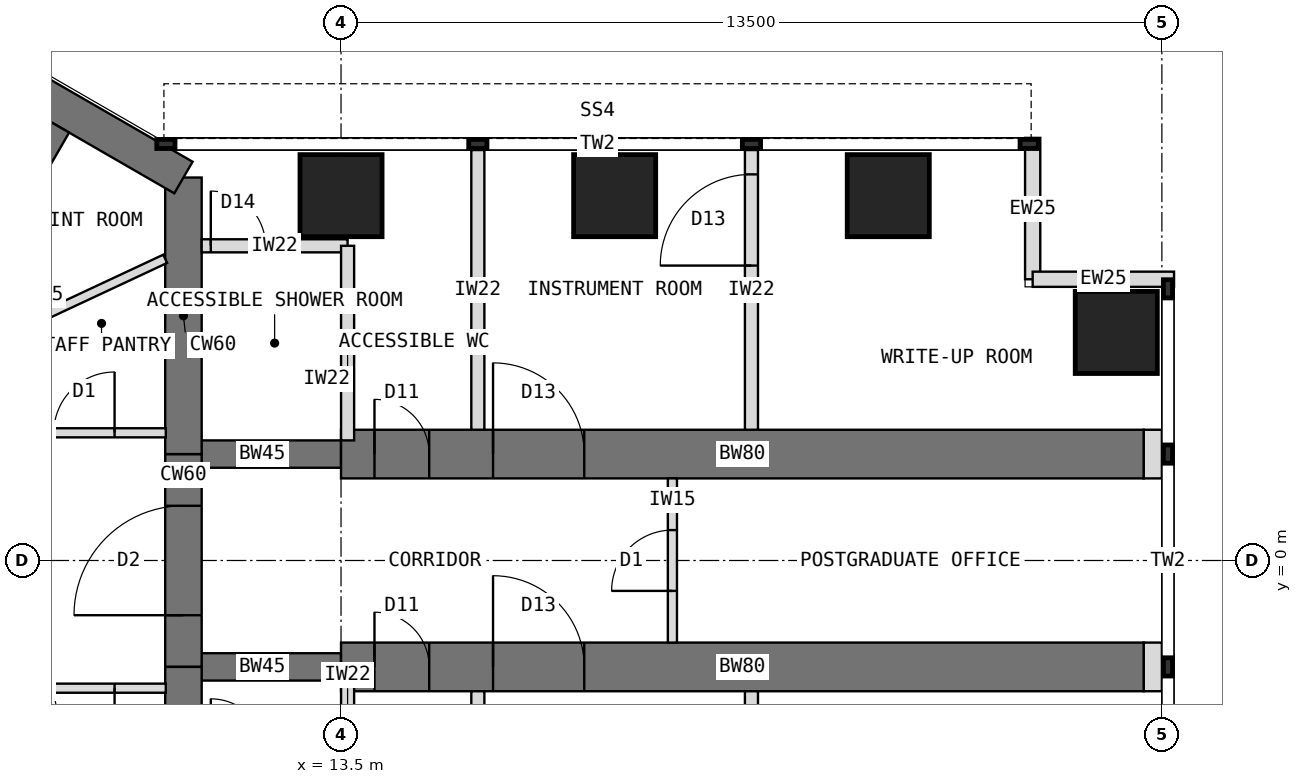
"""IFC4 building model, lengths in metres.
Left out: names, types, materials, properties, quantities, classifications, styles, units other than length and angle.
Written with IfcOpenShell. Run it as: python <this file> out.ifc"""

import sys

from ifc_helpers import new_model, si_unit, direction, frame, frame_2d, origin, origin_2d, place, context, subcontext, project, spatial, rectangle, extrude, element, fill, save


model = new_model("IFC4")
c1 = context("Model", 3, precision=1e-05, world=origin(), true_north=direction((0.0, 1.0)))
c2 = subcontext(c1, "Body", "Model", "MODEL_VIEW")
j1 = project(units=[si_unit("LENGTHUNIT", "METRE"), si_unit("PLANEANGLEUNIT", "RADIAN")], contexts=[c1])
p1 = place(None, origin())
s1 = spatial("IfcSite", under=j1, at=p1, CompositionType="ELEMENT")
p2 = place(p1, origin())
s2 = spatial("IfcBuilding", under=s1, at=p2, CompositionType="ELEMENT")
p3 = place(p2, frame((0.0, 0.0, 113.5)))
s3 = spatial("IfcBuildingStorey", under=s2, at=p3, CompositionType="ELEMENT", Elevation=113.5)
p4 = place(p3, frame((10.908, -6.298, 0.0), z_axis=(0.0, 0.0, 1.0), x_axis=(0.0, 1.0, 0.0)))
e1 = element("IfcWall", 1, at=p4, inside=s3, PredefinedType="SHEAR", context=c2, shape_type="SweptSolid", body=[
    extrude(rectangle(XDim=4.548, YDim=0.6, at=frame_2d((2.274, 0.0))), origin(), (0.0, 0.0, 1.0), 4.0),
])
p5 = place(p3, frame((10.908, -1.75, 0.0), z_axis=(0.0, 0.0, 1.0), x_axis=(0.0, 1.0, 0.0)))
e2 = element("IfcWall", 2, at=p5, inside=s3, PredefinedType="SHEAR", context=c2, shape_type="SweptSolid", body=[
    extrude(rectangle(XDim=3.5, YDim=0.6, at=frame_2d((1.75, 0.0))), origin(), (0.0, 0.0, 1.0), 4.0),
])
p6 = place(p5, frame((0.85, 0.0, 0.0)))
e3 = element("IfcOpeningElement", 3, at=p6, cuts=e2, PredefinedType="OPENING", context=c2, shape_type="SweptSolid", body=[
    extrude(rectangle(XDim=1.8, YDim=2.1, at=frame_2d((0.9, 1.05))), frame((0.0, 0.31, 0.0), z_axis=(0.0, -1.0, 0.0), x_axis=(1.0, 0.0, 0.0)), (0.0, 0.0, 1.0), 0.62),
])
p7 = place(p3, frame((10.908, 1.75, 0.0), z_axis=(0.0, 0.0, 1.0), x_axis=(0.0, 1.0, 0.0)))
e4 = element("IfcWall", 4, at=p7, inside=s3, PredefinedType="SHEAR", context=c2, shape_type="SweptSolid", body=[
    extrude(rectangle(XDim=4.548, YDim=0.6, at=frame_2d((2.274, 0.0))), origin(), (0.0, 0.0, 1.0), 4.0),
])
p8 = place(p3, frame((10.908, 6.298, 0.0), z_axis=(0.0, 0.0, 1.0), x_axis=(-0.866021940709, 0.500005998175, 0.0)))
e5 = element("IfcWall", 5, at=p8, inside=s3, PredefinedType="SHEAR", context=c2, shape_type="SweptSolid", body=[
    extrude(rectangle(XDim=12.596, YDim=0.6, at=frame_2d((6.298, 0.0))), origin(), (0.0, 0.0, 1.0), 4.0),
])
p9 = place(p3, frame((10.908, 1.75, 0.0), z_axis=(0.0, 0.0, 1.0), x_axis=(1.0, 0.0, 0.0)))
e6 = element("IfcWall", 6, at=p9, inside=s3, PredefinedType="SHEAR", context=c2, shape_type="SweptSolid", body=[
    extrude(rectangle(XDim=2.592, YDim=0.45, at=frame_2d((1.296, 0.0))), origin(), (0.0, 0.0, 1.0), 4.0),
])
p10 = place(p3, frame((13.5, 1.75, 0.0), z_axis=(0.0, 0.0, 1.0), x_axis=(1.0, 0.0, 0.0)))
e7 = element("IfcWall", 7, at=p10, inside=s3, PredefinedType="SHEAR", context=c2, shape_type="SweptSolid", body=[
    extrude(rectangle(XDim=13.2, YDim=0.8, at=frame_2d((6.6, 0.0))), origin(), (0.0, 0.0, 1.0), 4.0),
])
p11 = place(p10, frame((0.55, 0.0, 0.0)))
e8 = element("IfcOpeningElement", 8, at=p11, cuts=e7, PredefinedType="OPENING", context=c2, shape_type="SweptSolid", body=[
    extrude(rectangle(XDim=0.9, YDim=2.1, at=frame_2d((0.45, 1.05))), frame((0.0, 0.41, 0.0), z_axis=(0.0, -1.0, 0.0), x_axis=(1.0, 0.0, 0.0)), (0.0, 0.0, 1.0), 0.82),
])
p12 = place(p10, frame((2.5, 0.0, 0.0)))
e9 = element("IfcOpeningElement", 9, at=p12, cuts=e7, PredefinedType="OPENING", context=c2, shape_type="SweptSolid", body=[
    extrude(rectangle(XDim=1.5, YDim=2.1, at=frame_2d((0.75, 1.05))), frame((0.0, 0.41, 0.0), z_axis=(0.0, -1.0, 0.0), x_axis=(1.0, 0.0, 0.0)), (0.0, 0.0, 1.0), 0.82),
])
p13 = place(p3, frame((10.908, -1.75, 0.0), z_axis=(0.0, 0.0, 1.0), x_axis=(1.0, 0.0, 0.0)))
e10 = element("IfcWall", 10, at=p13, inside=s3, PredefinedType="SHEAR", context=c2, shape_type="SweptSolid", body=[
    extrude(rectangle(XDim=2.592, YDim=0.45, at=frame_2d((1.296, 0.0))), origin(), (0.0, 0.0, 1.0), 4.0),
])
p14 = place(p3, frame((13.5, -1.75, 0.0), z_axis=(0.0, 0.0, 1.0), x_axis=(1.0, 0.0, 0.0)))
e11 = element("IfcWall", 11, at=p14, inside=s3, PredefinedType="SHEAR", context=c2, shape_type="SweptSolid", body=[
    extrude(rectangle(XDim=13.2, YDim=0.8, at=frame_2d((6.6, 0.0))), origin(), (0.0, 0.0, 1.0), 4.0),
])
p15 = place(p14, frame((0.55, 0.0, 0.0)))
e12 = element("IfcOpeningElement", 12, at=p15, cuts=e11, PredefinedType="OPENING", context=c2, shape_type="SweptSolid", body=[
    extrude(rectangle(XDim=0.9, YDim=2.1, at=frame_2d((0.45, 1.05))), frame((0.0, 0.41, 0.0), z_axis=(0.0, -1.0, 0.0), x_axis=(1.0, 0.0, 0.0)), (0.0, 0.0, 1.0), 0.82),
])
p16 = place(p14, frame((2.5, 0.0, 0.0)))
e13 = element("IfcOpeningElement", 13, at=p16, cuts=e11, PredefinedType="OPENING", context=c2, shape_type="SweptSolid", body=[
    extrude(rectangle(XDim=1.5, YDim=2.1, at=frame_2d((0.75, 1.05))), frame((0.0, 0.41, 0.0), z_axis=(0.0, -1.0, 0.0), x_axis=(1.0, 0.0, 0.0)), (0.0, 0.0, 1.0), 0.82),
])
for number, where, z_axis, x_axis in (
    (14, (13.5, 6.0, 0.0), (0.0, 0.0, 1.0), (1.0, 0.0, 0.0)),
    (15, (18.0, 6.0, 0.0), (0.0, 0.0, 1.0), (1.0, 0.0, 0.0)),
    (16, (22.5, 6.0, 0.0), (0.0, 0.0, 1.0), (1.0, 0.0, 0.0)),
    (17, (26.25, 3.75, 0.0), (0.0, 0.0, 1.0), (1.0, 0.0, 0.0)),
):
    element("IfcColumn", number, at=place(p3, frame(where, z_axis=z_axis, x_axis=x_axis)), inside=s3, PredefinedType="COLUMN", context=c2, shape_type="SweptSolid", body=[
        extrude(rectangle(XDim=1.35, YDim=1.35, at=origin_2d()), origin(), (0.0, 0.0, 1.0), 4.0),
    ])
for number, where, z_axis, x_axis in (
    (18, (24.875, 6.95, 0.0), (0.0, 0.0, 1.0), (0.0, -1.0, 0.0)),
    (19, (24.875, 4.625, 0.0), (0.0, 0.0, 1.0), (1.0, 0.0, 0.0)),
):
    element("IfcWall", number, at=place(p3, frame(where, z_axis=z_axis, x_axis=x_axis)), inside=s3, PredefinedType="STANDARD", context=c2, shape_type="SweptSolid", body=[
        extrude(rectangle(XDim=2.325, YDim=0.25, at=frame_2d((1.163, 0.0))), origin(), (0.0, 0.0, 1.0), 3.8),
    ])
for number, where, z_axis, x_axis in (
    (20, (26.7, 1.75, 0.0), (0.0, 0.0, 1.0), (1.0, 0.0, 0.0)),
    (21, (26.7, -1.75, 0.0), (0.0, 0.0, 1.0), (1.0, 0.0, 0.0)),
):
    element("IfcWall", number, at=place(p3, frame(where, z_axis=z_axis, x_axis=x_axis)), inside=s3, PredefinedType="PARTITIONING", context=c2, shape_type="SweptSolid", body=[
        extrude(rectangle(XDim=0.3, YDim=0.8, at=frame_2d((0.15, 0.0))), origin(), (0.0, 0.0, 1.0), 3.8),
    ])
for number, where, z_axis, x_axis in (
    (22, (5.901, 2.02, 0.0), (0.0, 0.0, 1.0), (0.5, 0.866, 0.0)),
    (23, (5.901, -2.02, 0.0), (0.0, 0.0, 1.0), (0.5, -0.866, 0.0)),
):
    element("IfcWall", number, at=place(p3, frame(where, z_axis=z_axis, x_axis=x_axis)), inside=s3, PredefinedType="SHEAR", context=c2, shape_type="SweptSolid", body=[
        extrude(rectangle(XDim=5.908, YDim=0.4, at=frame_2d((2.954, 0.0))), origin(), (0.0, 0.0, 1.0), 4.0),
    ])
p17 = place(p3, frame((15.75, 2.15, 0.0), z_axis=(0.0, 0.0, 1.0), x_axis=(0.0, 1.0, 0.0)))
e24 = element("IfcWall", 24, at=p17, inside=s3, PredefinedType="PARTITIONING", context=c2, shape_type="SweptSolid", body=[
    extrude(rectangle(XDim=4.6, YDim=0.215, at=frame_2d((2.3, 0.0))), origin(), (0.0, 0.0, 1.0), 3.8),
])
p18 = place(p3, frame((20.25, 2.15, 0.0), z_axis=(0.0, 0.0, 1.0), x_axis=(0.0, 1.0, 0.0)))
e25 = element("IfcWall", 25, at=p18, inside=s3, PredefinedType="PARTITIONING", context=c2, shape_type="SweptSolid", body=[
    extrude(rectangle(XDim=4.6, YDim=0.215, at=frame_2d((2.3, 0.0))), origin(), (0.0, 0.0, 1.0), 3.8),
])
p19 = place(p18, frame((2.7, 0.0, 0.0)))
e26 = element("IfcOpeningElement", 26, at=p19, cuts=e25, PredefinedType="OPENING", context=c2, shape_type="SweptSolid", body=[
    extrude(rectangle(XDim=1.5, YDim=2.1, at=frame_2d((0.75, 1.05))), frame((0.0, 0.117, 0.0), z_axis=(0.0, -1.0, 0.0), x_axis=(1.0, 0.0, 0.0)), (0.0, 0.0, 1.0), 0.235),
])
p20 = place(p3, frame((11.208, 5.175, 0.0), z_axis=(0.0, 0.0, 1.0), x_axis=(1.0, 0.0, 0.0)))
e27 = element("IfcWall", 27, at=p20, inside=s3, PredefinedType="PARTITIONING", context=c2, shape_type="SweptSolid", body=[
    extrude(rectangle(XDim=2.4, YDim=0.215, at=frame_2d((1.2, 0.0))), origin(), (0.0, 0.0, 1.0), 3.8),
])
p21 = place(p20, frame((0.15, 0.0, 0.0)))
e28 = element("IfcOpeningElement", 28, at=p21, cuts=e27, PredefinedType="OPENING", context=c2, shape_type="SweptSolid", body=[
    extrude(rectangle(XDim=0.9, YDim=2.1, at=frame_2d((0.45, 1.05))), frame((0.0, 0.117, 0.0), z_axis=(0.0, -1.0, 0.0), x_axis=(1.0, 0.0, 0.0)), (0.0, 0.0, 1.0), 0.235),
])
p22 = place(p3, frame((13.608, 1.975, 0.0), z_axis=(0.0, 0.0, 1.0), x_axis=(0.0, 1.0, 0.0)))
e29 = element("IfcWall", 29, at=p22, inside=s3, PredefinedType="PARTITIONING", context=c2, shape_type="SweptSolid", body=[
    extrude(rectangle(XDim=3.2, YDim=0.215, at=frame_2d((1.6, 0.0))), origin(), (0.0, 0.0, 1.0), 3.8),
])
p23 = place(p3, frame((15.75, -2.15, 0.0), z_axis=(0.0, 0.0, 1.0), x_axis=(0.0, -1.0, 0.0)))
e30 = element("IfcWall", 30, at=p23, inside=s3, PredefinedType="PARTITIONING", context=c2, shape_type="SweptSolid", body=[
    extrude(rectangle(XDim=4.6, YDim=0.215, at=frame_2d((2.3, 0.0))), origin(), (0.0, 0.0, 1.0), 3.8),
])
p24 = place(p3, frame((20.25, -2.15, 0.0), z_axis=(0.0, 0.0, 1.0), x_axis=(0.0, -1.0, 0.0)))
e31 = element("IfcWall", 31, at=p24, inside=s3, PredefinedType="PARTITIONING", context=c2, shape_type="SweptSolid", body=[
    extrude(rectangle(XDim=4.6, YDim=0.215, at=frame_2d((2.3, 0.0))), origin(), (0.0, 0.0, 1.0), 3.8),
])
p25 = place(p24, frame((2.7, 0.0, 0.0)))
e32 = element("IfcOpeningElement", 32, at=p25, cuts=e31, PredefinedType="OPENING", context=c2, shape_type="SweptSolid", body=[
    extrude(rectangle(XDim=1.5, YDim=2.1, at=frame_2d((0.75, 1.05))), frame((0.0, 0.117, 0.0), z_axis=(0.0, -1.0, 0.0), x_axis=(1.0, 0.0, 0.0)), (0.0, 0.0, 1.0), 0.235),
])
p26 = place(p3, frame((13.608, -1.975, 0.0), z_axis=(0.0, 0.0, 1.0), x_axis=(0.0, -1.0, 0.0)))
e33 = element("IfcWall", 33, at=p26, inside=s3, PredefinedType="PARTITIONING", context=c2, shape_type="SweptSolid", body=[
    extrude(rectangle(XDim=1.2, YDim=0.215, at=frame_2d((0.6, 0.0))), origin(), (0.0, 0.0, 1.0), 3.8),
])
p27 = place(p3, frame((6.143, 2.1, 0.0), z_axis=(0.0, 0.0, 1.0), x_axis=(1.0, 0.0, 0.0)))
e34 = element("IfcWall", 34, at=p27, inside=s3, PredefinedType="PARTITIONING", context=c2, shape_type="SweptSolid", body=[
    extrude(rectangle(XDim=4.476, YDim=0.15, at=frame_2d((2.238, 0.0))), origin(), (0.0, 0.0, 1.0), 3.8),
])
p28 = place(p27, frame((2.633, 0.0, 0.0)))
e35 = element("IfcOpeningElement", 35, at=p28, cuts=e34, PredefinedType="OPENING", context=c2, shape_type="SweptSolid", body=[
    extrude(rectangle(XDim=1.0, YDim=2.1, at=frame_2d((0.5, 1.05))), frame((0.0, 0.085, 0.0), z_axis=(0.0, -1.0, 0.0), x_axis=(1.0, 0.0, 0.0)), (0.0, 0.0, 1.0), 0.17),
])
p29 = place(p3, frame((10.618, -2.1, 0.0), z_axis=(0.0, 0.0, 1.0), x_axis=(-1.0, 0.0, 0.0)))
e36 = element("IfcWall", 36, at=p29, inside=s3, PredefinedType="PARTITIONING", context=c2, shape_type="SweptSolid", body=[
    extrude(rectangle(XDim=4.476, YDim=0.15, at=frame_2d((2.238, 0.0))), origin(), (0.0, 0.0, 1.0), 3.8),
])
p30 = place(p29, frame((0.843, 0.0, 0.0)))
e37 = element("IfcOpeningElement", 37, at=p30, cuts=e36, PredefinedType="OPENING", context=c2, shape_type="SweptSolid", body=[
    extrude(rectangle(XDim=1.0, YDim=2.1, at=frame_2d((0.5, 1.05))), frame((0.0, 0.085, 0.0), z_axis=(0.0, -1.0, 0.0), x_axis=(1.0, 0.0, 0.0)), (0.0, 0.0, 1.0), 0.17),
])
p31 = place(p3, frame((6.485, 3.033, 0.0), z_axis=(0.0, 0.0, 1.0), x_axis=(0.905834774787, 0.423631161255, 0.0)))
e38 = element("IfcWall", 38, at=p31, inside=s3, PredefinedType="PARTITIONING", context=c2, shape_type="SweptSolid", body=[
    extrude(rectangle(XDim=4.552, YDim=0.15, at=frame_2d((2.276, 0.0))), origin(), (0.0, 0.0, 1.0), 3.8),
])
p32 = place(p31, frame((0.865, 0.0, 0.0)))
e39 = element("IfcOpeningElement", 39, at=p32, cuts=e38, PredefinedType="OPENING", context=c2, shape_type="SweptSolid", body=[
    extrude(rectangle(XDim=1.0, YDim=2.1, at=frame_2d((0.5, 1.05))), frame((0.0, 0.085, 0.0), z_axis=(0.0, -1.0, 0.0), x_axis=(1.0, 0.0, 0.0)), (0.0, 0.0, 1.0), 0.17),
])
p33 = place(p3, frame((18.95, -1.35, 0.0), z_axis=(0.0, 0.0, 1.0), x_axis=(0.0, 1.0, 0.0)))
e40 = element("IfcWall", 40, at=p33, inside=s3, PredefinedType="PARTITIONING", context=c2, shape_type="SweptSolid", body=[
    extrude(rectangle(XDim=2.7, YDim=0.15, at=frame_2d((1.35, 0.0))), origin(), (0.0, 0.0, 1.0), 3.8),
])
p34 = place(p33, frame((0.85, 0.0, 0.0)))
e41 = element("IfcOpeningElement", 41, at=p34, cuts=e40, PredefinedType="OPENING", context=c2, shape_type="SweptSolid", body=[
    extrude(rectangle(XDim=1.0, YDim=2.1, at=frame_2d((0.5, 1.05))), frame((0.0, 0.085, 0.0), z_axis=(0.0, -1.0, 0.0), x_axis=(1.0, 0.0, 0.0)), (0.0, 0.0, 1.0), 0.17),
])
p35 = place(p6, origin())
e42 = element("IfcDoor", 42, at=p35, inside=s3, OperationType="DOUBLE_DOOR_DOUBLE_SWING", PredefinedType="DOOR", context=c2, shape_type="SweptSolid", body=[
    extrude(rectangle(XDim=1.72, YDim=2.06, at=frame_2d((0.9, 1.03))), frame((0.0, 0.025, 0.0), z_axis=(0.0, -1.0, 0.0), x_axis=(1.0, 0.0, 0.0)), (0.0, 0.0, 1.0), 0.05),
    extrude(rectangle(XDim=0.04, YDim=2.1, at=frame_2d((0.02, 1.05))), frame((0.0, 0.3, 0.0), z_axis=(0.0, -1.0, 0.0), x_axis=(1.0, 0.0, 0.0)), (0.0, 0.0, 1.0), 0.6),
    extrude(rectangle(XDim=0.04, YDim=2.1, at=frame_2d((1.78, 1.05))), frame((0.0, 0.3, 0.0), z_axis=(0.0, -1.0, 0.0), x_axis=(1.0, 0.0, 0.0)), (0.0, 0.0, 1.0), 0.6),
    extrude(rectangle(XDim=1.72, YDim=0.04, at=frame_2d((0.9, 2.08))), frame((0.0, 0.3, 0.0), z_axis=(0.0, -1.0, 0.0), x_axis=(1.0, 0.0, 0.0)), (0.0, 0.0, 1.0), 0.6),
])
fill(e3, e42)
p36 = place(p19, origin())
e43 = element("IfcDoor", 43, at=p36, inside=s3, OperationType="DOUBLE_DOOR_SINGLE_SWING", PredefinedType="DOOR", context=c2, shape_type="SweptSolid", body=[
    extrude(rectangle(XDim=1.5, YDim=2.1, at=frame_2d((0.75, 1.05))), frame((0.0, 0.025, 0.0), z_axis=(0.0, -1.0, 0.0), x_axis=(1.0, 0.0, 0.0)), (0.0, 0.0, 1.0), 0.05),
])
fill(e26, e43)
p37 = place(p21, origin())
e44 = element("IfcDoor", 44, at=p37, inside=s3, OperationType="SINGLE_SWING_LEFT", PredefinedType="DOOR", context=c2, shape_type="SweptSolid", body=[
    extrude(rectangle(XDim=0.9, YDim=2.1, at=frame_2d((0.45, 1.05))), frame((0.0, 0.025, 0.0), z_axis=(0.0, -1.0, 0.0), x_axis=(1.0, 0.0, 0.0)), (0.0, 0.0, 1.0), 0.05),
])
fill(e28, e44)
p38 = place(p30, origin())
e45 = element("IfcDoor", 45, at=p38, inside=s3, OperationType="SINGLE_SWING_LEFT", PredefinedType="DOOR", context=c2, shape_type="SweptSolid", body=[
    extrude(rectangle(XDim=1.0, YDim=2.1, at=frame_2d((0.5, 1.05))), frame((0.0, 0.025, 0.0), z_axis=(0.0, -1.0, 0.0), x_axis=(1.0, 0.0, 0.0)), (0.0, 0.0, 1.0), 0.05),
])
fill(e37, e45)
p39 = place(p28, origin())
e46 = element("IfcDoor", 46, at=p39, inside=s3, OperationType="SINGLE_SWING_RIGHT", PredefinedType="DOOR", context=c2, shape_type="SweptSolid", body=[
    extrude(rectangle(XDim=1.0, YDim=2.1, at=frame_2d((0.5, 1.05))), frame((0.0, 0.025, 0.0), z_axis=(0.0, -1.0, 0.0), x_axis=(1.0, 0.0, 0.0)), (0.0, 0.0, 1.0), 0.05),
])
fill(e35, e46)
p40 = place(p34, origin())
e47 = element("IfcDoor", 47, at=p40, inside=s3, OperationType="SINGLE_SWING_LEFT", PredefinedType="DOOR", context=c2, shape_type="SweptSolid", body=[
    extrude(rectangle(XDim=1.0, YDim=2.1, at=frame_2d((0.5, 1.05))), frame((0.0, 0.025, 0.0), z_axis=(0.0, -1.0, 0.0), x_axis=(1.0, 0.0, 0.0)), (0.0, 0.0, 1.0), 0.05),
])
fill(e41, e47)
p41 = place(p11, origin())
e48 = element("IfcDoor", 48, at=p41, inside=s3, OperationType="SINGLE_SWING_LEFT", PredefinedType="DOOR", context=c2, shape_type="SweptSolid", body=[
    extrude(rectangle(XDim=0.82, YDim=2.06, at=frame_2d((0.45, 1.03))), frame((0.0, 0.025, 0.0), z_axis=(0.0, -1.0, 0.0), x_axis=(1.0, 0.0, 0.0)), (0.0, 0.0, 1.0), 0.05),
    extrude(rectangle(XDim=0.04, YDim=2.1, at=frame_2d((0.02, 1.05))), frame((0.0, 0.4, 0.0), z_axis=(0.0, -1.0, 0.0), x_axis=(1.0, 0.0, 0.0)), (0.0, 0.0, 1.0), 0.8),
    extrude(rectangle(XDim=0.04, YDim=2.1, at=frame_2d((0.88, 1.05))), frame((0.0, 0.4, 0.0), z_axis=(0.0, -1.0, 0.0), x_axis=(1.0, 0.0, 0.0)), (0.0, 0.0, 1.0), 0.8),
    extrude(rectangle(XDim=0.82, YDim=0.04, at=frame_2d((0.45, 2.08))), frame((0.0, 0.4, 0.0), z_axis=(0.0, -1.0, 0.0), x_axis=(1.0, 0.0, 0.0)), (0.0, 0.0, 1.0), 0.8),
])
fill(e8, e48)
p42 = place(p12, origin())
e49 = element("IfcDoor", 49, at=p42, inside=s3, OperationType="DOUBLE_DOOR_SINGLE_SWING", PredefinedType="DOOR", context=c2, shape_type="SweptSolid", body=[
    extrude(rectangle(XDim=1.42, YDim=2.06, at=frame_2d((0.75, 1.03))), frame((0.0, 0.025, 0.0), z_axis=(0.0, -1.0, 0.0), x_axis=(1.0, 0.0, 0.0)), (0.0, 0.0, 1.0), 0.05),
    extrude(rectangle(XDim=0.04, YDim=2.1, at=frame_2d((0.02, 1.05))), frame((0.0, 0.4, 0.0), z_axis=(0.0, -1.0, 0.0), x_axis=(1.0, 0.0, 0.0)), (0.0, 0.0, 1.0), 0.8),
    extrude(rectangle(XDim=0.04, YDim=2.1, at=frame_2d((1.48, 1.05))), frame((0.0, 0.4, 0.0), z_axis=(0.0, -1.0, 0.0), x_axis=(1.0, 0.0, 0.0)), (0.0, 0.0, 1.0), 0.8),
    extrude(rectangle(XDim=1.42, YDim=0.04, at=frame_2d((0.75, 2.08))), frame((0.0, 0.4, 0.0), z_axis=(0.0, -1.0, 0.0), x_axis=(1.0, 0.0, 0.0)), (0.0, 0.0, 1.0), 0.8),
])
fill(e9, e49)
p43 = place(p15, origin())
e50 = element("IfcDoor", 50, at=p43, inside=s3, OperationType="SINGLE_SWING_LEFT", PredefinedType="DOOR", context=c2, shape_type="SweptSolid", body=[
    extrude(rectangle(XDim=0.82, YDim=2.06, at=frame_2d((0.45, 1.03))), frame((0.0, 0.025, 0.0), z_axis=(0.0, -1.0, 0.0), x_axis=(1.0, 0.0, 0.0)), (0.0, 0.0, 1.0), 0.05),
    extrude(rectangle(XDim=0.04, YDim=2.1, at=frame_2d((0.02, 1.05))), frame((0.0, 0.4, 0.0), z_axis=(0.0, -1.0, 0.0), x_axis=(1.0, 0.0, 0.0)), (0.0, 0.0, 1.0), 0.8),
    extrude(rectangle(XDim=0.04, YDim=2.1, at=frame_2d((0.88, 1.05))), frame((0.0, 0.4, 0.0), z_axis=(0.0, -1.0, 0.0), x_axis=(1.0, 0.0, 0.0)), (0.0, 0.0, 1.0), 0.8),
    extrude(rectangle(XDim=0.82, YDim=0.04, at=frame_2d((0.45, 2.08))), frame((0.0, 0.4, 0.0), z_axis=(0.0, -1.0, 0.0), x_axis=(1.0, 0.0, 0.0)), (0.0, 0.0, 1.0), 0.8),
])
fill(e12, e50)
p44 = place(p16, origin())
e51 = element("IfcDoor", 51, at=p44, inside=s3, OperationType="DOUBLE_DOOR_SINGLE_SWING", PredefinedType="DOOR", context=c2, shape_type="SweptSolid", body=[
    extrude(rectangle(XDim=1.42, YDim=2.06, at=frame_2d((0.75, 1.03))), frame((0.0, 0.025, 0.0), z_axis=(0.0, -1.0, 0.0), x_axis=(1.0, 0.0, 0.0)), (0.0, 0.0, 1.0), 0.05),
    extrude(rectangle(XDim=0.04, YDim=2.1, at=frame_2d((0.02, 1.05))), frame((0.0, 0.4, 0.0), z_axis=(0.0, -1.0, 0.0), x_axis=(1.0, 0.0, 0.0)), (0.0, 0.0, 1.0), 0.8),
    extrude(rectangle(XDim=0.04, YDim=2.1, at=frame_2d((1.48, 1.05))), frame((0.0, 0.4, 0.0), z_axis=(0.0, -1.0, 0.0), x_axis=(1.0, 0.0, 0.0)), (0.0, 0.0, 1.0), 0.8),
    extrude(rectangle(XDim=1.42, YDim=0.04, at=frame_2d((0.75, 2.08))), frame((0.0, 0.4, 0.0), z_axis=(0.0, -1.0, 0.0), x_axis=(1.0, 0.0, 0.0)), (0.0, 0.0, 1.0), 0.8),
])
fill(e13, e51)
save(model, sys.argv[1])
